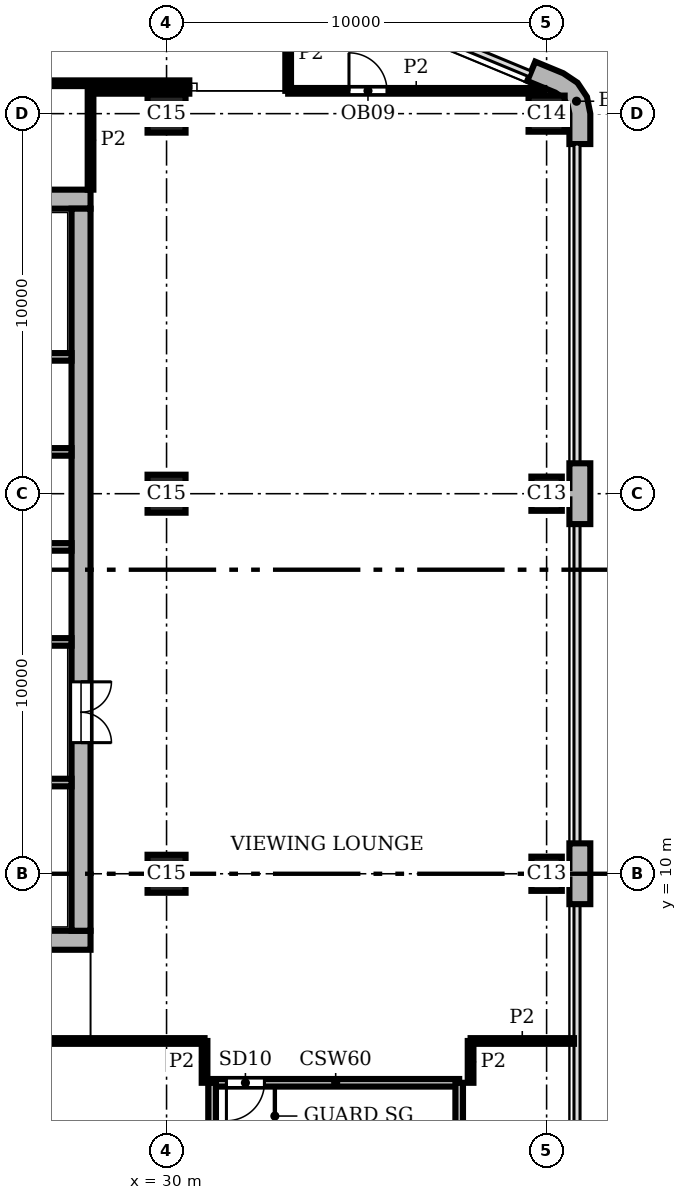
"""IFC4 building model, lengths in metres.
Left out: names, types, materials, properties, quantities, classifications, styles, units other than length and angle.
Written with IfcOpenShell. Run it as: python <this file> out.ifc"""

import sys

from ifc_helpers import new_model, si_unit, direction, frame, frame_2d, origin, origin_2d, place, context, subcontext, project, spatial, polyline, rectangle, outline, extrude, element, fill, save


model = new_model("IFC4")
c1 = context("Model", 3, precision=1e-05, world=origin(), true_north=direction((0.0, 1.0)))
c2 = subcontext(c1, "Body", "Model", "MODEL_VIEW")
j1 = project(units=[si_unit("LENGTHUNIT", "METRE"), si_unit("PLANEANGLEUNIT", "RADIAN")], contexts=[c1])
p1 = place(None, origin())
s1 = spatial("IfcSite", under=j1, at=p1, CompositionType="ELEMENT")
p2 = place(p1, origin())
s2 = spatial("IfcBuilding", under=s1, at=p2, CompositionType="ELEMENT")
p3 = place(p2, frame((0.0, 0.0, 358.2)))
s3 = spatial("IfcBuildingStorey", under=s2, at=p3, CompositionType="ELEMENT", Elevation=358.2)
for number, where, z_axis, x_axis in (
    (1, (40.0, 10.0, 0.0), (0.0, 0.0, 1.0), (0.0, 1.0, 0.0)),
    (2, (40.0, 20.0, 0.0), (0.0, 0.0, 1.0), (0.0, 1.0, 0.0)),
):
    element("IfcColumn", number, at=place(p3, frame(where, z_axis=z_axis, x_axis=x_axis)), inside=s3, PredefinedType="COLUMN", context=c2, shape_type="SweptSolid", body=[
        extrude(rectangle(XDim=0.9, YDim=0.8, at=origin_2d()), origin(), (0.0, 0.0, 1.0), 7.2),
    ])
p4 = place(p3, frame((40.0, 30.0, 0.0), z_axis=(0.0, 0.0, 1.0), x_axis=(1.0, 0.0, 0.0)))
e3 = element("IfcColumn", 3, at=p4, inside=s3, PredefinedType="COLUMN", context=c2, shape_type="SweptSolid", body=[
    extrude(rectangle(XDim=0.95, YDim=0.95, at=origin_2d()), origin(), (0.0, 0.0, 1.0), 7.2),
])
for number, where, z_axis, x_axis in (
    (4, (30.0, 10.0, 0.0), (0.0, 0.0, 1.0), (1.0, 0.0, 0.0)),
    (5, (30.0, 20.0, 0.0), (0.0, 0.0, 1.0), (1.0, 0.0, 0.0)),
    (6, (30.0, 30.0, 0.0), (0.0, 0.0, 1.0), (1.0, 0.0, 0.0)),
):
    element("IfcColumn", number, at=place(p3, frame(where, z_axis=z_axis, x_axis=x_axis)), inside=s3, PredefinedType="COLUMN", context=c2, shape_type="SweptSolid", body=[
        extrude(rectangle(XDim=1.0, YDim=1.0, at=origin_2d()), origin(), (0.0, 0.0, 1.0), 7.2),
    ])
p5 = place(p3, frame((8.0, 8.25, 0.0), z_axis=(0.0, 0.0, 1.0), x_axis=(1.0, 0.0, 0.0)))
e7 = element("IfcWall", 7, at=p5, inside=s3, PredefinedType="SHEAR", context=c2, shape_type="SweptSolid", body=[
    extrude(rectangle(XDim=20.0, YDim=0.5, at=frame_2d((10.0, 0.0))), origin(), (0.0, 0.0, 1.0), 7.2),
])
p6 = place(p3, frame((27.75, 8.5, 0.0), z_axis=(0.0, 0.0, 1.0), x_axis=(0.0, 1.0, 0.0)))
e8 = element("IfcWall", 8, at=p6, inside=s3, PredefinedType="SHEAR", context=c2, shape_type="SweptSolid", body=[
    extrude(rectangle(XDim=19.0, YDim=0.5, at=frame_2d((9.5, 0.0))), origin(), (0.0, 0.0, 1.0), 7.2),
])
p7 = place(p6, frame((4.95, 0.0, 0.0)))
e9 = element("IfcOpeningElement", 9, at=p7, cuts=e8, PredefinedType="OPENING", context=c2, shape_type="SweptSolid", body=[
    extrude(rectangle(XDim=1.6, YDim=2.1, at=frame_2d((0.8, 1.05))), frame((0.0, 0.26, 0.0), z_axis=(0.0, -1.0, 0.0), x_axis=(1.0, 0.0, 0.0)), (0.0, 0.0, 1.0), 0.52),
])
p8 = place(p3, frame((28.0, 27.75, 0.0), z_axis=(0.0, 0.0, 1.0), x_axis=(-1.0, 0.0, 0.0)))
e10 = element("IfcWall", 10, at=p8, inside=s3, PredefinedType="SHEAR", context=c2, shape_type="SweptSolid", body=[
    extrude(rectangle(XDim=20.0, YDim=0.5, at=frame_2d((10.0, 0.0))), origin(), (0.0, 0.0, 1.0), 7.2),
])
p9 = place(p3, origin())
e11 = element("IfcWall", 11, at=p9, inside=s3, PredefinedType="SOLIDWALL", context=c2, shape_type="SweptSolid", body=[
    extrude(outline(polyline([(40.0, 9.85), (40.6, 9.85), (40.6, 9.2), (41.0, 9.2), (41.15, 9.2), (41.15, 10.0), (41.15, 10.8), (41.0, 10.8), (40.6, 10.8), (40.6, 10.15), (40.0, 10.15), (40.0, 9.85)])), origin(), (0.0, 0.0, 1.0), 7.2),
])
e12 = element("IfcWall", 12, at=p9, inside=s3, PredefinedType="SOLIDWALL", context=c2, shape_type="SweptSolid", body=[
    extrude(outline(polyline([(40.0, 19.85), (40.6, 19.85), (40.6, 19.2), (41.0, 19.2), (41.15, 19.2), (41.15, 20.0), (41.15, 20.8), (41.0, 20.8), (40.6, 20.8), (40.6, 20.15), (40.0, 20.15), (40.0, 19.85)])), origin(), (0.0, 0.0, 1.0), 7.2),
])
e13 = element("IfcWall", 13, at=p9, inside=s3, PredefinedType="SOLIDWALL", context=c2, shape_type="SweptSolid", body=[
    extrude(outline(polyline([(41.0, 29.2), (41.15, 29.2), (41.15, 30.0), (41.062, 30.44), (40.813, 30.813), (40.44, 31.062), (39.701, 31.369), (39.644, 31.23), (39.49, 30.861), (40.229, 30.554), (40.424, 30.424), (40.554, 30.229), (40.6, 30.0), (40.6, 29.2), (41.0, 29.2)])), origin(), (0.0, 0.0, 1.0), 7.2),
])
p10 = place(p3, frame((31.2, 4.5, 0.0), z_axis=(0.0, 0.0, 1.0), x_axis=(1.0, 0.0, 0.0)))
e14 = element("IfcWall", 14, at=p10, inside=s3, PredefinedType="SHEAR", context=c2, shape_type="SweptSolid", body=[
    extrude(rectangle(XDim=6.5, YDim=0.2, at=frame_2d((3.25, 0.0))), origin(), (0.0, 0.0, 1.0), 6.75),
])
p11 = place(p10, frame((0.375, 0.0, 0.0)))
e15 = element("IfcOpeningElement", 15, at=p11, cuts=e14, PredefinedType="OPENING", context=c2, shape_type="SweptSolid", body=[
    extrude(rectangle(XDim=1.0, YDim=2.1, at=frame_2d((0.5, 1.05))), frame((0.0, 0.11, 0.0), z_axis=(0.0, -1.0, 0.0), x_axis=(1.0, 0.0, 0.0)), (0.0, 0.0, 1.0), 0.22),
])
p12 = place(p3, frame((13.8, 12.4, 0.0), z_axis=(0.0, 0.0, 1.0), x_axis=(1.0, 0.0, 0.0)))
e16 = element("IfcWall", 16, at=p12, inside=s3, PredefinedType="SHEAR", context=c2, shape_type="SweptSolid", body=[
    extrude(rectangle(XDim=13.7, YDim=0.2, at=frame_2d((6.85, 0.0))), origin(), (0.0, 0.0, 1.0), 6.75),
])
p13 = place(p12, frame((2.4, 0.0, 0.0)))
e17 = element("IfcOpeningElement", 17, at=p13, cuts=e16, PredefinedType="OPENING", context=c2, shape_type="SweptSolid", body=[
    extrude(rectangle(XDim=1.1, YDim=2.1, at=frame_2d((0.55, 1.05))), frame((0.0, 0.11, 0.0), z_axis=(0.0, -1.0, 0.0), x_axis=(1.0, 0.0, 0.0)), (0.0, 0.0, 1.0), 0.22),
])
p14 = place(p12, frame((4.9, 0.0, 0.0)))
e18 = element("IfcOpeningElement", 18, at=p14, cuts=e16, PredefinedType="OPENING", context=c2, shape_type="SweptSolid", body=[
    extrude(rectangle(XDim=1.1, YDim=2.1, at=frame_2d((0.55, 1.05))), frame((0.0, 0.11, 0.0), z_axis=(0.0, -1.0, 0.0), x_axis=(1.0, 0.0, 0.0)), (0.0, 0.0, 1.0), 0.22),
])
p15 = place(p12, frame((0.15, 0.0, 0.0)))
e19 = element("IfcOpeningElement", 19, at=p15, cuts=e16, PredefinedType="OPENING", context=c2, shape_type="SweptSolid", body=[
    extrude(rectangle(XDim=1.0, YDim=2.1, at=frame_2d((0.5, 1.05))), frame((0.0, 0.11, 0.0), z_axis=(0.0, -1.0, 0.0), x_axis=(1.0, 0.0, 0.0)), (0.0, 0.0, 1.0), 0.22),
])
for number, where, z_axis, x_axis in (
    (20, (24.3, 16.1, 0.0), (0.0, 0.0, 1.0), (1.0, 0.0, 0.0)),
    (21, (24.3, 18.6, 0.0), (0.0, 0.0, 1.0), (1.0, 0.0, 0.0)),
    (22, (24.3, 21.1, 0.0), (0.0, 0.0, 1.0), (1.0, 0.0, 0.0)),
):
    element("IfcWall", number, at=place(p3, frame(where, z_axis=z_axis, x_axis=x_axis)), inside=s3, PredefinedType="SHEAR", context=c2, shape_type="SweptSolid", body=[
        extrude(rectangle(XDim=3.2, YDim=0.2, at=frame_2d((1.6, 0.0))), origin(), (0.0, 0.0, 1.0), 6.75),
    ])
p16 = place(p3, frame((13.8, 23.6, 0.0), z_axis=(0.0, 0.0, 1.0), x_axis=(1.0, 0.0, 0.0)))
e23 = element("IfcWall", 23, at=p16, inside=s3, PredefinedType="SHEAR", context=c2, shape_type="SweptSolid", body=[
    extrude(rectangle(XDim=13.7, YDim=0.2, at=frame_2d((6.85, 0.0))), origin(), (0.0, 0.0, 1.0), 6.75),
])
p17 = place(p16, frame((2.4, 0.0, 0.0)))
e24 = element("IfcOpeningElement", 24, at=p17, cuts=e23, PredefinedType="OPENING", context=c2, shape_type="SweptSolid", body=[
    extrude(rectangle(XDim=1.1, YDim=2.1, at=frame_2d((0.55, 1.05))), frame((0.0, 0.11, 0.0), z_axis=(0.0, -1.0, 0.0), x_axis=(1.0, 0.0, 0.0)), (0.0, 0.0, 1.0), 0.22),
])
p18 = place(p16, frame((4.9, 0.0, 0.0)))
e25 = element("IfcOpeningElement", 25, at=p18, cuts=e23, PredefinedType="OPENING", context=c2, shape_type="SweptSolid", body=[
    extrude(rectangle(XDim=1.1, YDim=2.1, at=frame_2d((0.55, 1.05))), frame((0.0, 0.11, 0.0), z_axis=(0.0, -1.0, 0.0), x_axis=(1.0, 0.0, 0.0)), (0.0, 0.0, 1.0), 0.22),
])
p19 = place(p16, frame((0.15, 0.0, 0.0)))
e26 = element("IfcOpeningElement", 26, at=p19, cuts=e23, PredefinedType="OPENING", context=c2, shape_type="SweptSolid", body=[
    extrude(rectangle(XDim=1.0, YDim=2.1, at=frame_2d((0.5, 1.05))), frame((0.0, 0.11, 0.0), z_axis=(0.0, -1.0, 0.0), x_axis=(1.0, 0.0, 0.0)), (0.0, 0.0, 1.0), 0.22),
])
for number, where, z_axis, x_axis in (
    (27, (31.2, 1.2, 0.0), (0.0, 0.0, 1.0), (0.0, 1.0, 0.0)),
    (28, (37.7, 1.2, 0.0), (0.0, 0.0, 1.0), (0.0, 1.0, 0.0)),
):
    element("IfcWall", number, at=place(p3, frame(where, z_axis=z_axis, x_axis=x_axis)), inside=s3, PredefinedType="SHEAR", context=c2, shape_type="SweptSolid", body=[
        extrude(rectangle(XDim=3.3, YDim=0.2, at=frame_2d((1.65, 0.0))), origin(), (0.0, 0.0, 1.0), 6.75),
    ])
p20 = place(p3, frame((28.0, 28.0, 0.0), z_axis=(0.0, 0.0, 1.0), x_axis=(0.0, 1.0, 0.0)))
e29 = element("IfcWall", 29, at=p20, inside=s3, PredefinedType="PARTITIONING", context=c2, shape_type="SweptSolid", body=[
    extrude(rectangle(XDim=2.598, YDim=0.15, at=frame_2d((1.299, 0.0))), origin(), (0.0, 0.0, 1.0), 6.75),
])
p21 = place(p3, frame((31.0, 4.5, 0.0), z_axis=(0.0, 0.0, 1.0), x_axis=(0.0, 1.0, 0.0)))
e30 = element("IfcWall", 30, at=p21, inside=s3, PredefinedType="PARTITIONING", context=c2, shape_type="SweptSolid", body=[
    extrude(rectangle(XDim=1.1, YDim=0.15, at=frame_2d((0.55, 0.0))), origin(), (0.0, 0.0, 1.0), 6.75),
])
p22 = place(p3, frame((33.2, 30.6, 0.0), z_axis=(0.0, 0.0, 1.0), x_axis=(0.0, 1.0, 0.0)))
e31 = element("IfcWall", 31, at=p22, inside=s3, PredefinedType="PARTITIONING", context=c2, shape_type="SweptSolid", body=[
    extrude(rectangle(XDim=1.952, YDim=0.15, at=frame_2d((0.976, 0.0))), origin(), (0.0, 0.0, 1.0), 6.75),
])
p23 = place(p3, frame((38.0, 4.5, 0.0), z_axis=(0.0, 0.0, 1.0), x_axis=(0.0, 1.0, 0.0)))
e32 = element("IfcWall", 32, at=p23, inside=s3, PredefinedType="PARTITIONING", context=c2, shape_type="SweptSolid", body=[
    extrude(rectangle(XDim=1.1, YDim=0.15, at=frame_2d((0.55, 0.0))), origin(), (0.0, 0.0, 1.0), 6.75),
])
p24 = place(p3, frame((5.6, 5.6, 0.0), z_axis=(0.0, 0.0, 1.0), x_axis=(1.0, 0.0, 0.0)))
e33 = element("IfcWall", 33, at=p24, inside=s3, PredefinedType="PARTITIONING", context=c2, shape_type="SweptSolid", body=[
    extrude(rectangle(XDim=25.4, YDim=0.15, at=frame_2d((12.7, 0.0))), origin(), (0.0, 0.0, 1.0), 6.75),
])
p25 = place(p24, frame((11.35, 0.0, 0.0)))
e34 = element("IfcOpeningElement", 34, at=p25, cuts=e33, PredefinedType="OPENING", context=c2, shape_type="SweptSolid", body=[
    extrude(rectangle(XDim=1.8, YDim=2.1, at=frame_2d((0.9, 1.05))), frame((0.0, 0.085, 0.0), z_axis=(0.0, -1.0, 0.0), x_axis=(1.0, 0.0, 0.0)), (0.0, 0.0, 1.0), 0.17),
])
p26 = place(p3, frame((38.0, 5.6, 0.0), z_axis=(0.0, 0.0, 1.0), x_axis=(1.0, 0.0, 0.0)))
e35 = element("IfcWall", 35, at=p26, inside=s3, PredefinedType="PARTITIONING", context=c2, shape_type="SweptSolid", body=[
    extrude(rectangle(XDim=2.72, YDim=0.15, at=frame_2d((1.36, 0.0))), origin(), (0.0, 0.0, 1.0), 6.75),
])
p27 = place(p3, frame((28.002, 30.6, 0.0), z_axis=(0.0, 0.0, 1.0), x_axis=(1.0, 0.0, 0.0)))
e36 = element("IfcWall", 36, at=p27, inside=s3, PredefinedType="PARTITIONING", context=c2, shape_type="SweptSolid", body=[
    extrude(rectangle(XDim=2.597, YDim=0.15, at=frame_2d((1.299, 0.0))), origin(), (0.0, 0.0, 1.0), 6.75),
])
p28 = place(p3, frame((33.2, 30.6, 0.0), z_axis=(0.0, 0.0, 1.0), x_axis=(1.0, 0.0, 0.0)))
e37 = element("IfcWall", 37, at=p28, inside=s3, PredefinedType="PARTITIONING", context=c2, shape_type="SweptSolid", body=[
    extrude(rectangle(XDim=6.738, YDim=0.15, at=frame_2d((3.369, 0.0))), origin(), (0.0, 0.0, 1.0), 6.75),
])
p29 = place(p28, frame((1.6, 0.0, 0.0)))
e38 = element("IfcOpeningElement", 38, at=p29, cuts=e37, PredefinedType="OPENING", context=c2, shape_type="SweptSolid", body=[
    extrude(rectangle(XDim=1.0, YDim=2.1, at=frame_2d((0.5, 1.05))), frame((0.0, 0.085, 0.0), z_axis=(0.0, -1.0, 0.0), x_axis=(1.0, 0.0, 0.0)), (0.0, 0.0, 1.0), 0.17),
])
p30 = place(p3, frame((13.802, 30.8, 0.0), z_axis=(0.0, 0.0, 1.0), x_axis=(1.0, 0.0, 0.0)))
e39 = element("IfcWall", 39, at=p30, inside=s3, PredefinedType="PARTITIONING", context=c2, shape_type="SweptSolid", body=[
    extrude(rectangle(XDim=16.797, YDim=0.15, at=frame_2d((8.398, 0.0))), origin(), (0.0, 0.0, 1.0), 6.75),
])
p31 = place(p30, frame((7.85, 0.0, 0.0)))
e40 = element("IfcOpeningElement", 40, at=p31, cuts=e39, PredefinedType="OPENING", context=c2, shape_type="SweptSolid", body=[
    extrude(rectangle(XDim=1.0, YDim=2.1, at=frame_2d((0.5, 1.05))), frame((0.0, 0.085, 0.0), z_axis=(0.0, -1.0, 0.0), x_axis=(1.0, 0.0, 0.0)), (0.0, 0.0, 1.0), 0.17),
])
p32 = place(p11, frame((1.0, 0.0, 0.0), z_axis=(0.0, 0.0, 1.0), x_axis=(-1.0, 0.0, 0.0)))
e41 = element("IfcDoor", 41, at=p32, inside=s3, OperationType="SINGLE_SWING_RIGHT", PredefinedType="DOOR", context=c2, shape_type="SweptSolid", body=[
    extrude(rectangle(XDim=1.0, YDim=2.1, at=frame_2d((0.5, 1.05))), frame((0.0, 0.025, 0.0), z_axis=(0.0, -1.0, 0.0), x_axis=(1.0, 0.0, 0.0)), (0.0, 0.0, 1.0), 0.05),
])
fill(e15, e41)
p33 = place(p7, frame((1.6, 0.0, 0.0), z_axis=(0.0, 0.0, 1.0), x_axis=(-1.0, 0.0, 0.0)))
e42 = element("IfcDoor", 42, at=p33, inside=s3, OperationType="DOUBLE_DOOR_SINGLE_SWING", PredefinedType="DOOR", context=c2, shape_type="SweptSolid", body=[
    extrude(rectangle(XDim=1.6, YDim=2.1, at=frame_2d((0.8, 1.05))), frame((0.0, 0.025, 0.0), z_axis=(0.0, -1.0, 0.0), x_axis=(1.0, 0.0, 0.0)), (0.0, 0.0, 1.0), 0.05),
])
fill(e9, e42)
p34 = place(p29, origin())
e43 = element("IfcDoor", 43, at=p34, inside=s3, OperationType="SINGLE_SWING_LEFT", PredefinedType="DOOR", context=c2, shape_type="SweptSolid", body=[
    extrude(rectangle(XDim=1.0, YDim=2.1, at=frame_2d((0.5, 1.05))), frame((0.0, 0.025, 0.0), z_axis=(0.0, -1.0, 0.0), x_axis=(1.0, 0.0, 0.0)), (0.0, 0.0, 1.0), 0.05),
])
fill(e38, e43)
save(model, sys.argv[1])
